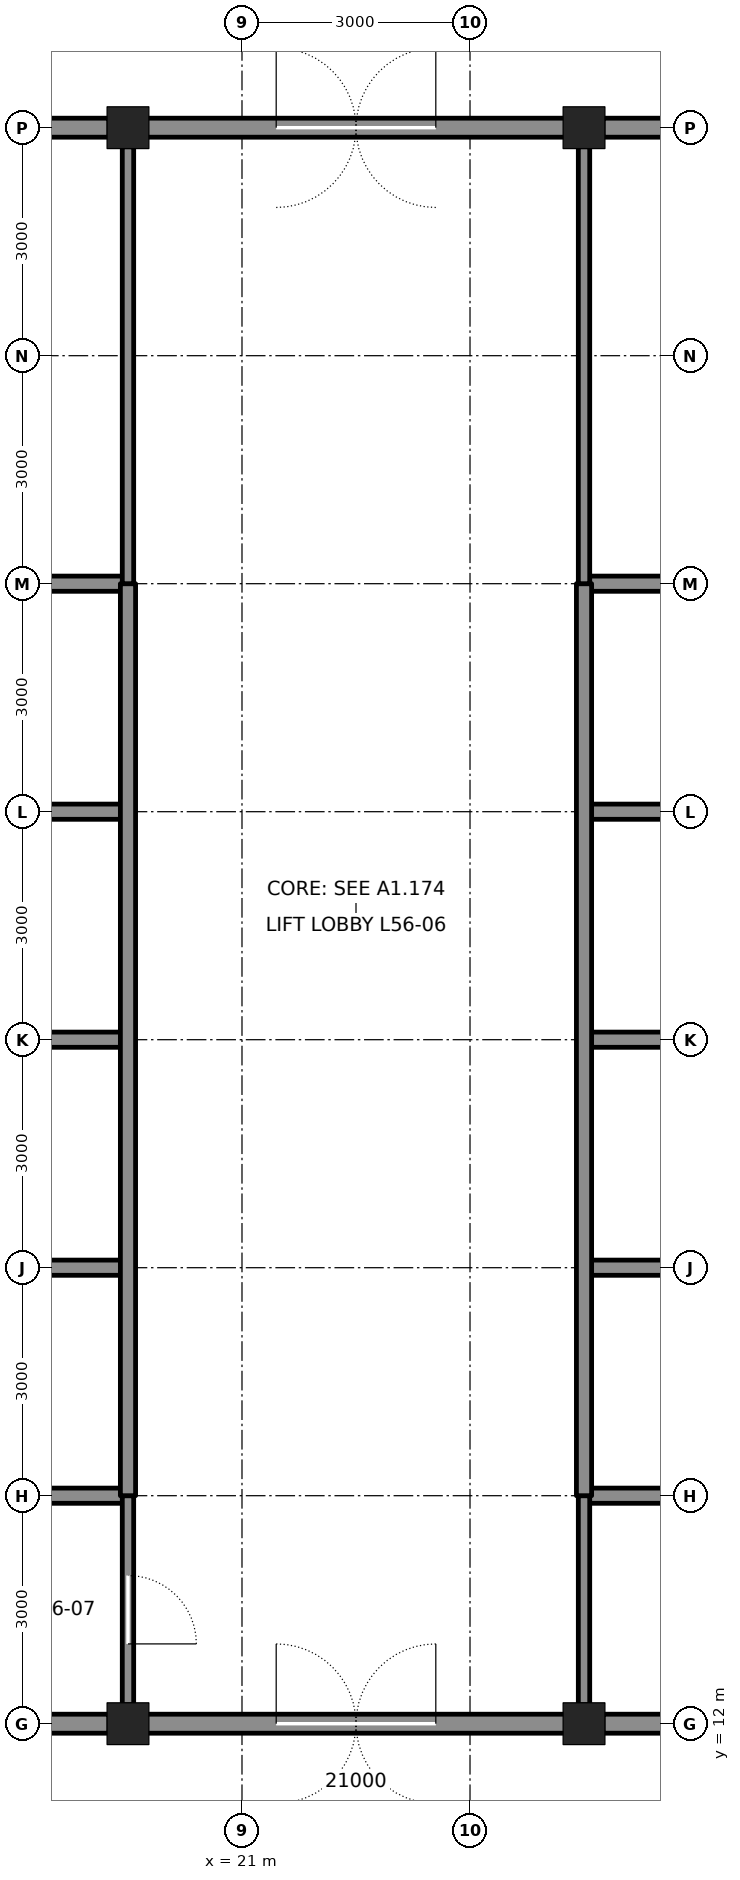
"""IFC4 building model, lengths in metres.
Left out: names, types, materials, properties, quantities, classifications, styles, units other than length and angle.
Written with IfcOpenShell. Run it as: python <this file> out.ifc"""

import sys

from ifc_helpers import new_model, si_unit, direction, frame, frame_2d, origin, origin_2d, place, context, subcontext, project, spatial, rectangle, hollow_rectangle, extrude, element, fill, save


model = new_model("IFC4")
c1 = context("Model", 3, precision=1e-05, world=origin(), true_north=direction((0.0, 1.0)))
c2 = subcontext(c1, "Body", "Model", "MODEL_VIEW")
j1 = project(units=[si_unit("LENGTHUNIT", "METRE"), si_unit("PLANEANGLEUNIT", "RADIAN")], contexts=[c1])
p1 = place(None, origin())
s1 = spatial("IfcSite", under=j1, at=p1, CompositionType="ELEMENT")
p2 = place(p1, origin())
s2 = spatial("IfcBuilding", under=s1, at=p2, CompositionType="ELEMENT")
p3 = place(p2, frame((0.0, 0.0, 251.7)))
s3 = spatial("IfcBuildingStorey", under=s2, at=p3, CompositionType="ELEMENT", Elevation=251.7)
for number, where, z_axis, x_axis in (
    (1, (19.5, 12.0, 0.0), (0.0, 0.0, 1.0), (1.0, 0.0, 0.0)),
    (2, (25.5, 12.0, 0.0), (0.0, 0.0, 1.0), (1.0, 0.0, 0.0)),
    (3, (19.5, 33.0, 0.0), (0.0, 0.0, 1.0), (1.0, 0.0, 0.0)),
    (4, (25.5, 33.0, 0.0), (0.0, 0.0, 1.0), (1.0, 0.0, 0.0)),
):
    element("IfcColumn", number, at=place(p3, frame(where, z_axis=z_axis, x_axis=x_axis)), inside=s3, PredefinedType="COLUMN", context=c2, shape_type="SweptSolid", body=[
        extrude(hollow_rectangle(XDim=0.55, YDim=0.55, WallThickness=0.045, at=origin_2d()), origin(), (0.0, 0.0, 1.0), 6.0),
    ])
for number, where, z_axis, x_axis in (
    (5, (16.75, 12.0, 0.0), (0.0, 0.0, 1.0), (1.0, 0.0, 0.0)),
    (6, (25.75, 12.0, 0.0), (0.0, 0.0, 1.0), (1.0, 0.0, 0.0)),
):
    element("IfcWall", number, at=place(p3, frame(where, z_axis=z_axis, x_axis=x_axis)), inside=s3, PredefinedType="SOLIDWALL", context=c2, shape_type="SweptSolid", body=[
        extrude(rectangle(XDim=2.5, YDim=0.25, at=frame_2d((1.25, 0.0))), origin(), (0.0, 0.0, 1.0), 4.981),
    ])
for number, where, z_axis, x_axis in (
    (7, (12.0, 15.0, 0.0), (0.0, 0.0, 1.0), (1.0, 0.0, 0.0)),
    (8, (25.5, 15.0, 0.0), (0.0, 0.0, 1.0), (1.0, 0.0, 0.0)),
):
    element("IfcWall", number, at=place(p3, frame(where, z_axis=z_axis, x_axis=x_axis)), inside=s3, PredefinedType="SOLIDWALL", context=c2, shape_type="SweptSolid", body=[
        extrude(rectangle(XDim=7.5, YDim=0.2, at=frame_2d((3.75, 0.0))), origin(), (0.0, 0.0, 1.0), 5.84),
    ])
for number, where, z_axis, x_axis in (
    (9, (16.75, 24.0, 0.0), (0.0, 0.0, 1.0), (1.0, 0.0, 0.0)),
    (10, (25.5, 24.0, 0.0), (0.0, 0.0, 1.0), (1.0, 0.0, 0.0)),
):
    element("IfcWall", number, at=place(p3, frame(where, z_axis=z_axis, x_axis=x_axis)), inside=s3, PredefinedType="SOLIDWALL", context=c2, shape_type="SweptSolid", body=[
        extrude(rectangle(XDim=2.75, YDim=0.2, at=frame_2d((1.375, 0.0))), origin(), (0.0, 0.0, 1.0), 4.89),
    ])
p4 = place(p3, frame((12.0, 27.0, 0.0), z_axis=(0.0, 0.0, 1.0), x_axis=(1.0, 0.0, 0.0)))
e11 = element("IfcWall", 11, at=p4, inside=s3, PredefinedType="SOLIDWALL", context=c2, shape_type="SweptSolid", body=[
    extrude(rectangle(XDim=7.5, YDim=0.2, at=frame_2d((3.75, 0.0))), origin(), (0.0, 0.0, 1.0), 5.84),
])
p5 = place(p4, frame((1.65, 0.0, 0.0)))
e12 = element("IfcOpeningElement", 12, at=p5, cuts=e11, PredefinedType="OPENING", context=c2, shape_type="SweptSolid", body=[
    extrude(rectangle(XDim=1.2, YDim=2.1, at=frame_2d((0.6, 1.05))), frame((0.0, 0.11, 0.0), z_axis=(0.0, -1.0, 0.0), x_axis=(1.0, 0.0, 0.0)), (0.0, 0.0, 1.0), 0.22),
])
p6 = place(p3, frame((25.5, 27.0, 0.0), z_axis=(0.0, 0.0, 1.0), x_axis=(1.0, 0.0, 0.0)))
e13 = element("IfcWall", 13, at=p6, inside=s3, PredefinedType="SOLIDWALL", context=c2, shape_type="SweptSolid", body=[
    extrude(rectangle(XDim=3.0, YDim=0.2, at=frame_2d((1.5, 0.0))), origin(), (0.0, 0.0, 1.0), 5.84),
])
for number, where, z_axis, x_axis in (
    (14, (16.75, 33.0, 0.0), (0.0, 0.0, 1.0), (1.0, 0.0, 0.0)),
    (15, (25.75, 33.0, 0.0), (0.0, 0.0, 1.0), (1.0, 0.0, 0.0)),
):
    element("IfcWall", number, at=place(p3, frame(where, z_axis=z_axis, x_axis=x_axis)), inside=s3, PredefinedType="SOLIDWALL", context=c2, shape_type="SweptSolid", body=[
        extrude(rectangle(XDim=2.5, YDim=0.25, at=frame_2d((1.25, 0.0))), origin(), (0.0, 0.0, 1.0), 4.981),
    ])
p7 = place(p3, frame((16.5, 18.0, 0.0), z_axis=(0.0, 0.0, 1.0), x_axis=(1.0, 0.0, 0.0)))
e16 = element("IfcWall", 16, at=p7, inside=s3, PredefinedType="SOLIDWALL", context=c2, shape_type="SweptSolid", body=[
    extrude(rectangle(XDim=3.0, YDim=0.2, at=frame_2d((1.5, 0.0))), origin(), (0.0, 0.0, 1.0), 5.84),
])
p8 = place(p3, frame((25.5, 18.0, 0.0), z_axis=(0.0, 0.0, 1.0), x_axis=(1.0, 0.0, 0.0)))
e17 = element("IfcWall", 17, at=p8, inside=s3, PredefinedType="SOLIDWALL", context=c2, shape_type="SweptSolid", body=[
    extrude(rectangle(XDim=7.5, YDim=0.2, at=frame_2d((3.75, 0.0))), origin(), (0.0, 0.0, 1.0), 5.84),
])
p9 = place(p8, frame((4.65, 0.0, 0.0)))
e18 = element("IfcOpeningElement", 18, at=p9, cuts=e17, PredefinedType="OPENING", context=c2, shape_type="SweptSolid", body=[
    extrude(rectangle(XDim=1.2, YDim=2.1, at=frame_2d((0.6, 1.05))), frame((0.0, 0.11, 0.0), z_axis=(0.0, -1.0, 0.0), x_axis=(1.0, 0.0, 0.0)), (0.0, 0.0, 1.0), 0.22),
])
for number, where, z_axis, x_axis in (
    (19, (16.75, 21.0, 0.0), (0.0, 0.0, 1.0), (1.0, 0.0, 0.0)),
    (20, (25.5, 21.0, 0.0), (0.0, 0.0, 1.0), (1.0, 0.0, 0.0)),
):
    element("IfcWall", number, at=place(p3, frame(where, z_axis=z_axis, x_axis=x_axis)), inside=s3, PredefinedType="SOLIDWALL", context=c2, shape_type="SweptSolid", body=[
        extrude(rectangle(XDim=2.75, YDim=0.2, at=frame_2d((1.375, 0.0))), origin(), (0.0, 0.0, 1.0), 4.89),
    ])
p10 = place(p3, frame((19.5, 12.25, 0.0), z_axis=(0.0, 0.0, 1.0), x_axis=(0.0, 1.0, 0.0)))
e21 = element("IfcWall", 21, at=p10, inside=s3, PredefinedType="PARTITIONING", context=c2, shape_type="SweptSolid", body=[
    extrude(rectangle(XDim=2.75, YDim=0.15, at=frame_2d((1.375, 0.0))), origin(), (0.0, 0.0, 1.0), 4.865),
])
p11 = place(p10, frame((0.8, 0.0, 0.0)))
e22 = element("IfcOpeningElement", 22, at=p11, cuts=e21, PredefinedType="OPENING", context=c2, shape_type="SweptSolid", body=[
    extrude(rectangle(XDim=0.9, YDim=2.1, at=frame_2d((0.45, 1.05))), frame((0.0, 0.085, 0.0), z_axis=(0.0, -1.0, 0.0), x_axis=(1.0, 0.0, 0.0)), (0.0, 0.0, 1.0), 0.17),
])
p12 = place(p3, frame((19.5, 15.0, 0.0), z_axis=(0.0, 0.0, 1.0), x_axis=(0.0, 1.0, 0.0)))
e23 = element("IfcWall", 23, at=p12, inside=s3, PredefinedType="SOLIDWALL", context=c2, shape_type="SweptSolid", body=[
    extrude(rectangle(XDim=12.0, YDim=0.2, at=frame_2d((6.0, 0.0))), origin(), (0.0, 0.0, 1.0), 4.865),
])
p13 = place(p3, frame((19.5, 27.0, 0.0), z_axis=(0.0, 0.0, 1.0), x_axis=(0.0, 1.0, 0.0)))
e24 = element("IfcWall", 24, at=p13, inside=s3, PredefinedType="PARTITIONING", context=c2, shape_type="SweptSolid", body=[
    extrude(rectangle(XDim=5.75, YDim=0.15, at=frame_2d((2.875, 0.0))), origin(), (0.0, 0.0, 1.0), 4.865),
])
p14 = place(p3, frame((25.5, 12.25, 0.0), z_axis=(0.0, 0.0, 1.0), x_axis=(0.0, 1.0, 0.0)))
e25 = element("IfcWall", 25, at=p14, inside=s3, PredefinedType="PARTITIONING", context=c2, shape_type="SweptSolid", body=[
    extrude(rectangle(XDim=2.75, YDim=0.15, at=frame_2d((1.375, 0.0))), origin(), (0.0, 0.0, 1.0), 4.865),
])
p15 = place(p3, frame((25.5, 15.0, 0.0), z_axis=(0.0, 0.0, 1.0), x_axis=(0.0, 1.0, 0.0)))
e26 = element("IfcWall", 26, at=p15, inside=s3, PredefinedType="SOLIDWALL", context=c2, shape_type="SweptSolid", body=[
    extrude(rectangle(XDim=12.0, YDim=0.2, at=frame_2d((6.0, 0.0))), origin(), (0.0, 0.0, 1.0), 4.865),
])
p16 = place(p3, frame((25.5, 27.0, 0.0), z_axis=(0.0, 0.0, 1.0), x_axis=(0.0, 1.0, 0.0)))
e27 = element("IfcWall", 27, at=p16, inside=s3, PredefinedType="PARTITIONING", context=c2, shape_type="SweptSolid", body=[
    extrude(rectangle(XDim=5.75, YDim=0.15, at=frame_2d((2.875, 0.0))), origin(), (0.0, 0.0, 1.0), 4.865),
])
p17 = place(p3, frame((19.5, 12.0, 0.0), z_axis=(0.0, 0.0, 1.0), x_axis=(1.0, 0.0, 0.0)))
e28 = element("IfcWall", 28, at=p17, inside=s3, PredefinedType="SOLIDWALL", context=c2, shape_type="SweptSolid", body=[
    extrude(rectangle(XDim=6.0, YDim=0.25, at=frame_2d((3.0, 0.0))), origin(), (0.0, 0.0, 1.0), 4.981),
])
p18 = place(p17, frame((1.95, 0.0, 0.0)))
e29 = element("IfcOpeningElement", 29, at=p18, cuts=e28, PredefinedType="OPENING", context=c2, shape_type="SweptSolid", body=[
    extrude(rectangle(XDim=2.1, YDim=2.4, at=frame_2d((1.05, 1.2))), frame((0.0, 0.135, 0.0), z_axis=(0.0, -1.0, 0.0), x_axis=(1.0, 0.0, 0.0)), (0.0, 0.0, 1.0), 0.27),
])
p19 = place(p3, frame((19.5, 33.0, 0.0), z_axis=(0.0, 0.0, 1.0), x_axis=(1.0, 0.0, 0.0)))
e30 = element("IfcWall", 30, at=p19, inside=s3, PredefinedType="SOLIDWALL", context=c2, shape_type="SweptSolid", body=[
    extrude(rectangle(XDim=6.0, YDim=0.25, at=frame_2d((3.0, 0.0))), origin(), (0.0, 0.0, 1.0), 4.981),
])
p20 = place(p19, frame((1.95, 0.0, 0.0)))
e31 = element("IfcOpeningElement", 31, at=p20, cuts=e30, PredefinedType="OPENING", context=c2, shape_type="SweptSolid", body=[
    extrude(rectangle(XDim=2.1, YDim=2.4, at=frame_2d((1.05, 1.2))), frame((0.0, 0.135, 0.0), z_axis=(0.0, -1.0, 0.0), x_axis=(1.0, 0.0, 0.0)), (0.0, 0.0, 1.0), 0.27),
])
p21 = place(p18, origin())
e32 = element("IfcDoor", 32, at=p21, inside=s3, OperationType="DOUBLE_DOOR_DOUBLE_SWING", PredefinedType="DOOR", context=c2, shape_type="SweptSolid", body=[
    extrude(rectangle(XDim=2.1, YDim=2.4, at=frame_2d((1.05, 1.2))), frame((0.0, 0.025, 0.0), z_axis=(0.0, -1.0, 0.0), x_axis=(1.0, 0.0, 0.0)), (0.0, 0.0, 1.0), 0.05),
])
fill(e29, e32)
p22 = place(p20, origin())
e33 = element("IfcDoor", 33, at=p22, inside=s3, OperationType="DOUBLE_DOOR_DOUBLE_SWING", PredefinedType="DOOR", context=c2, shape_type="SweptSolid", body=[
    extrude(rectangle(XDim=2.1, YDim=2.4, at=frame_2d((1.05, 1.2))), frame((0.0, 0.025, 0.0), z_axis=(0.0, -1.0, 0.0), x_axis=(1.0, 0.0, 0.0)), (0.0, 0.0, 1.0), 0.05),
])
fill(e31, e33)
p23 = place(p11, frame((0.9, 0.0, 0.0), z_axis=(0.0, 0.0, 1.0), x_axis=(-1.0, 0.0, 0.0)))
e34 = element("IfcDoor", 34, at=p23, inside=s3, OperationType="SINGLE_SWING_RIGHT", PredefinedType="DOOR", context=c2, shape_type="SweptSolid", body=[
    extrude(rectangle(XDim=0.9, YDim=2.1, at=frame_2d((0.45, 1.05))), frame((0.0, 0.025, 0.0), z_axis=(0.0, -1.0, 0.0), x_axis=(1.0, 0.0, 0.0)), (0.0, 0.0, 1.0), 0.05),
])
fill(e22, e34)
save(model, sys.argv[1])
